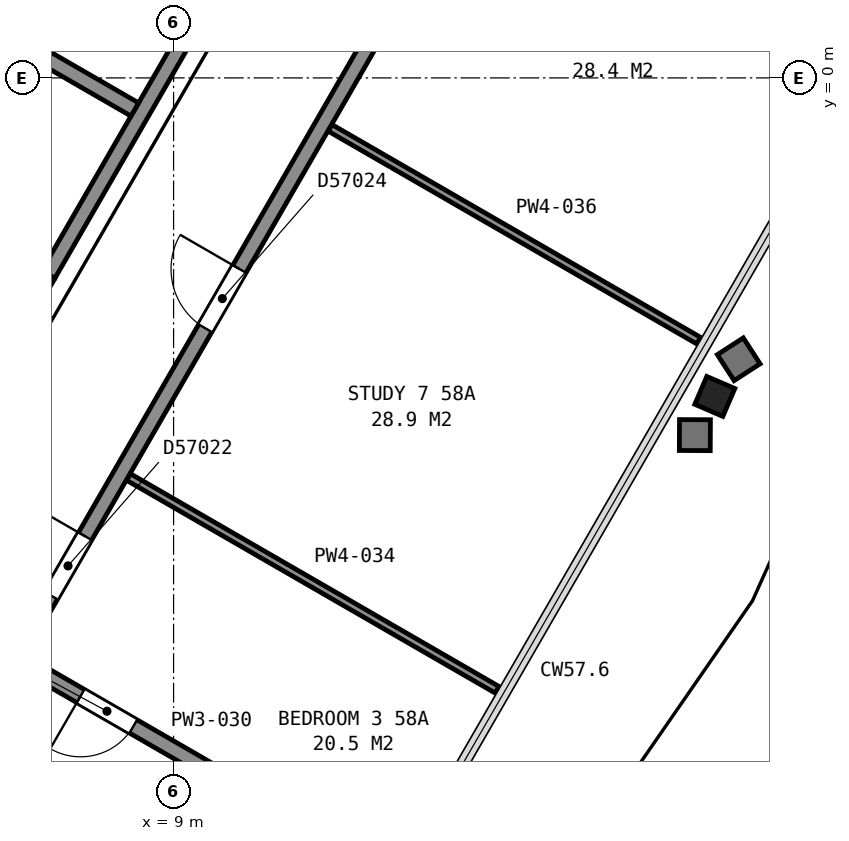
"""IFC4 building model, lengths in metres.
Left out: names, types, materials, properties, quantities, classifications, styles, units other than length and angle.
Written with IfcOpenShell. Run it as: python <this file> out.ifc"""

import sys

from ifc_helpers import new_model, si_unit, direction, frame, frame_2d, origin, origin_2d, place, context, subcontext, project, spatial, rectangle, i_section, extrude, element, fill, save


model = new_model("IFC4")
c1 = context("Model", 3, precision=1e-05, world=origin(), true_north=direction((0.0, 1.0)))
c2 = subcontext(c1, "Body", "Model", "MODEL_VIEW")
j1 = project(units=[si_unit("LENGTHUNIT", "METRE"), si_unit("PLANEANGLEUNIT", "RADIAN")], contexts=[c1])
p1 = place(None, origin())
s1 = spatial("IfcSite", under=j1, at=p1, CompositionType="ELEMENT")
p2 = place(p1, origin())
s2 = spatial("IfcBuilding", under=s1, at=p2, CompositionType="ELEMENT")
p3 = place(p2, frame((0.0, 0.0, 232.3)))
s3 = spatial("IfcBuildingStorey", under=s2, at=p3, CompositionType="ELEMENT", Elevation=232.3)
p4 = place(p3, frame((15.916, -4.103, 0.035), z_axis=(0.172603021318, -0.074378492921, 0.982179228462), x_axis=(-0.499986606679, -0.865745882945, 0.022303795753)))
e1 = element("IfcColumn", 1, at=p4, inside=s3, PredefinedType="COLUMN", context=c2, shape_type="SweptSolid", body=[
    extrude(i_section(OverallWidth=0.401, OverallDepth=0.399, WebThickness=0.025, FlangeThickness=0.04, FilletRadius=0.015, at=origin_2d()), origin(), (0.0, 0.0, 1.0), 3.696),
])
p5 = place(p3, frame((7.351, -2.587, 0.0), z_axis=(0.0, 0.0, 1.0), x_axis=(0.500002801628, 0.866023786258, 0.0)))
e2 = element("IfcWall", 2, at=p5, inside=s3, PredefinedType="PARTITIONING", context=c2, shape_type="SweptSolid", body=[
    extrude(rectangle(XDim=4.9, YDim=0.2, at=frame_2d((2.45, 0.0))), origin(), (0.0, 0.0, 1.0), 3.7),
])
p6 = place(p3, frame((5.663, -1.612, 0.0), z_axis=(0.0, 0.0, 1.0), x_axis=(0.49998122708, 0.866036242063, 0.0)))
e3 = element("IfcWall", 3, at=p6, inside=s3, PredefinedType="PARTITIONING", context=c2, shape_type="SweptSolid", body=[
    extrude(rectangle(XDim=4.9, YDim=0.2, at=frame_2d((2.45, 0.0))), origin(), (0.0, 0.0, 1.0), 3.7),
])
p7 = place(p3, frame((8.49, -0.416, 0.0), z_axis=(0.0, 0.0, 1.0), x_axis=(-0.866036909293, 0.499980071345, 0.0)))
e4 = element("IfcWall", 4, at=p7, inside=s3, PredefinedType="PARTITIONING", context=c2, shape_type="SweptSolid", body=[
    extrude(rectangle(XDim=1.75, YDim=0.2, at=frame_2d((0.875, 0.0))), origin(), (0.0, 0.0, 1.0), 3.7),
])
p8 = place(p3, frame((6.042, -4.855, 0.0), z_axis=(0.0, 0.0, 1.0), x_axis=(0.500252727967, 0.865879442048, 0.0)))
e5 = element("IfcWall", 5, at=p8, inside=s3, PredefinedType="PARTITIONING", context=c2, shape_type="SweptSolid", body=[
    extrude(rectangle(XDim=2.617, YDim=0.2, at=frame_2d((1.309, 0.0))), origin(), (0.0, 0.0, 1.0), 3.45),
])
p9 = place(p3, frame((12.903, 2.745, 0.0), z_axis=(0.0, 0.0, 1.0), x_axis=(-0.499999743747, -0.866025551732, 0.0)))
e6 = element("IfcWall", 6, at=p9, inside=s3, PredefinedType="PARTITIONING", context=c2, shape_type="SweptSolid", body=[
    extrude(rectangle(XDim=17.656, YDim=0.2, at=frame_2d((8.828, 0.0))), origin(), (0.0, 0.0, 1.0), 2.713),
])
p10 = place(p9, frame((10.134, 0.0, 0.0)))
e7 = element("IfcOpeningElement", 7, at=p10, cuts=e6, PredefinedType="OPENING", context=c2, shape_type="SweptSolid", body=[
    extrude(rectangle(XDim=0.9, YDim=2.1, at=frame_2d((0.45, 1.05))), frame((0.0, 0.11, 0.0), z_axis=(0.0, -1.0, 0.0), x_axis=(1.0, 0.0, 0.0)), (0.0, 0.0, 1.0), 0.22),
])
p11 = place(p9, frame((6.073, 0.0, 0.0)))
e8 = element("IfcOpeningElement", 8, at=p11, cuts=e6, PredefinedType="OPENING", context=c2, shape_type="SweptSolid", body=[
    extrude(rectangle(XDim=0.9, YDim=2.1, at=frame_2d((0.45, 1.05))), frame((0.0, 0.11, 0.0), z_axis=(0.0, -1.0, 0.0), x_axis=(1.0, 0.0, 0.0)), (0.0, 0.0, 1.0), 0.22),
])
p12 = place(p3, frame((9.423, -9.083, 0.0), z_axis=(0.0, 0.0, 1.0), x_axis=(-0.866041588165, 0.499971966783, 0.0)))
e9 = element("IfcWall", 9, at=p12, inside=s3, PredefinedType="PARTITIONING", context=c2, shape_type="SweptSolid", body=[
    extrude(rectangle(XDim=2.795, YDim=0.2, at=frame_2d((1.397, 0.0))), origin(), (0.0, 0.0, 1.0), 2.713),
])
p13 = place(p12, frame((1.1, 0.0, 0.0)))
e10 = element("IfcOpeningElement", 10, at=p13, cuts=e9, PredefinedType="OPENING", context=c2, shape_type="SweptSolid", body=[
    extrude(rectangle(XDim=0.8, YDim=2.1, at=frame_2d((0.4, 1.05))), frame((0.0, 0.11, 0.0), z_axis=(0.0, -1.0, 0.0), x_axis=(1.0, 0.0, 0.0)), (0.0, 0.0, 1.0), 0.22),
])
p14 = place(p3, frame((8.407, -5.251, 0.0), z_axis=(0.0, 0.0, 1.0), x_axis=(0.866061432277, -0.499937591627, 0.0)))
e11 = element("IfcWall", 11, at=p14, inside=s3, PredefinedType="PARTITIONING", context=c2, shape_type="SweptSolid", body=[
    extrude(rectangle(XDim=5.599, YDim=0.1, at=frame_2d((2.8, 0.0))), origin(), (0.0, 0.0, 1.0), 2.713),
])
p15 = place(p3, frame((11.059, -0.657, 0.0), z_axis=(0.0, 0.0, 1.0), x_axis=(0.866064348871, -0.499932539064, 0.0)))
e12 = element("IfcWall", 12, at=p15, inside=s3, PredefinedType="PARTITIONING", context=c2, shape_type="SweptSolid", body=[
    extrude(rectangle(XDim=5.6, YDim=0.1, at=frame_2d((2.8, 0.0))), origin(), (0.0, 0.0, 1.0), 2.713),
])
p16 = place(p10, origin())
e13 = element("IfcDoor", 13, at=p16, inside=s3, OperationType="SINGLE_SWING_LEFT", PredefinedType="DOOR", context=c2, shape_type="SweptSolid", body=[
    extrude(rectangle(XDim=0.9, YDim=2.1, at=frame_2d((0.45, 1.05))), frame((0.0, 0.025, 0.0), z_axis=(0.0, -1.0, 0.0), x_axis=(1.0, 0.0, 0.0)), (0.0, 0.0, 1.0), 0.05),
])
fill(e7, e13)
p17 = place(p11, origin())
e14 = element("IfcDoor", 14, at=p17, inside=s3, OperationType="SINGLE_SWING_LEFT", PredefinedType="DOOR", context=c2, shape_type="SweptSolid", body=[
    extrude(rectangle(XDim=0.9, YDim=2.1, at=frame_2d((0.45, 1.05))), frame((0.0, 0.025, 0.0), z_axis=(0.0, -1.0, 0.0), x_axis=(1.0, 0.0, 0.0)), (0.0, 0.0, 1.0), 0.05),
])
fill(e8, e14)
p18 = place(p13, origin())
e15 = element("IfcDoor", 15, at=p18, inside=s3, OperationType="SINGLE_SWING_RIGHT", PredefinedType="DOOR", context=c2, shape_type="SweptSolid", body=[
    extrude(rectangle(XDim=0.8, YDim=2.1, at=frame_2d((0.4, 1.05))), frame((0.0, 0.025, 0.0), z_axis=(0.0, -1.0, 0.0), x_axis=(1.0, 0.0, 0.0)), (0.0, 0.0, 1.0), 0.05),
])
fill(e10, e15)
save(model, sys.argv[1])
